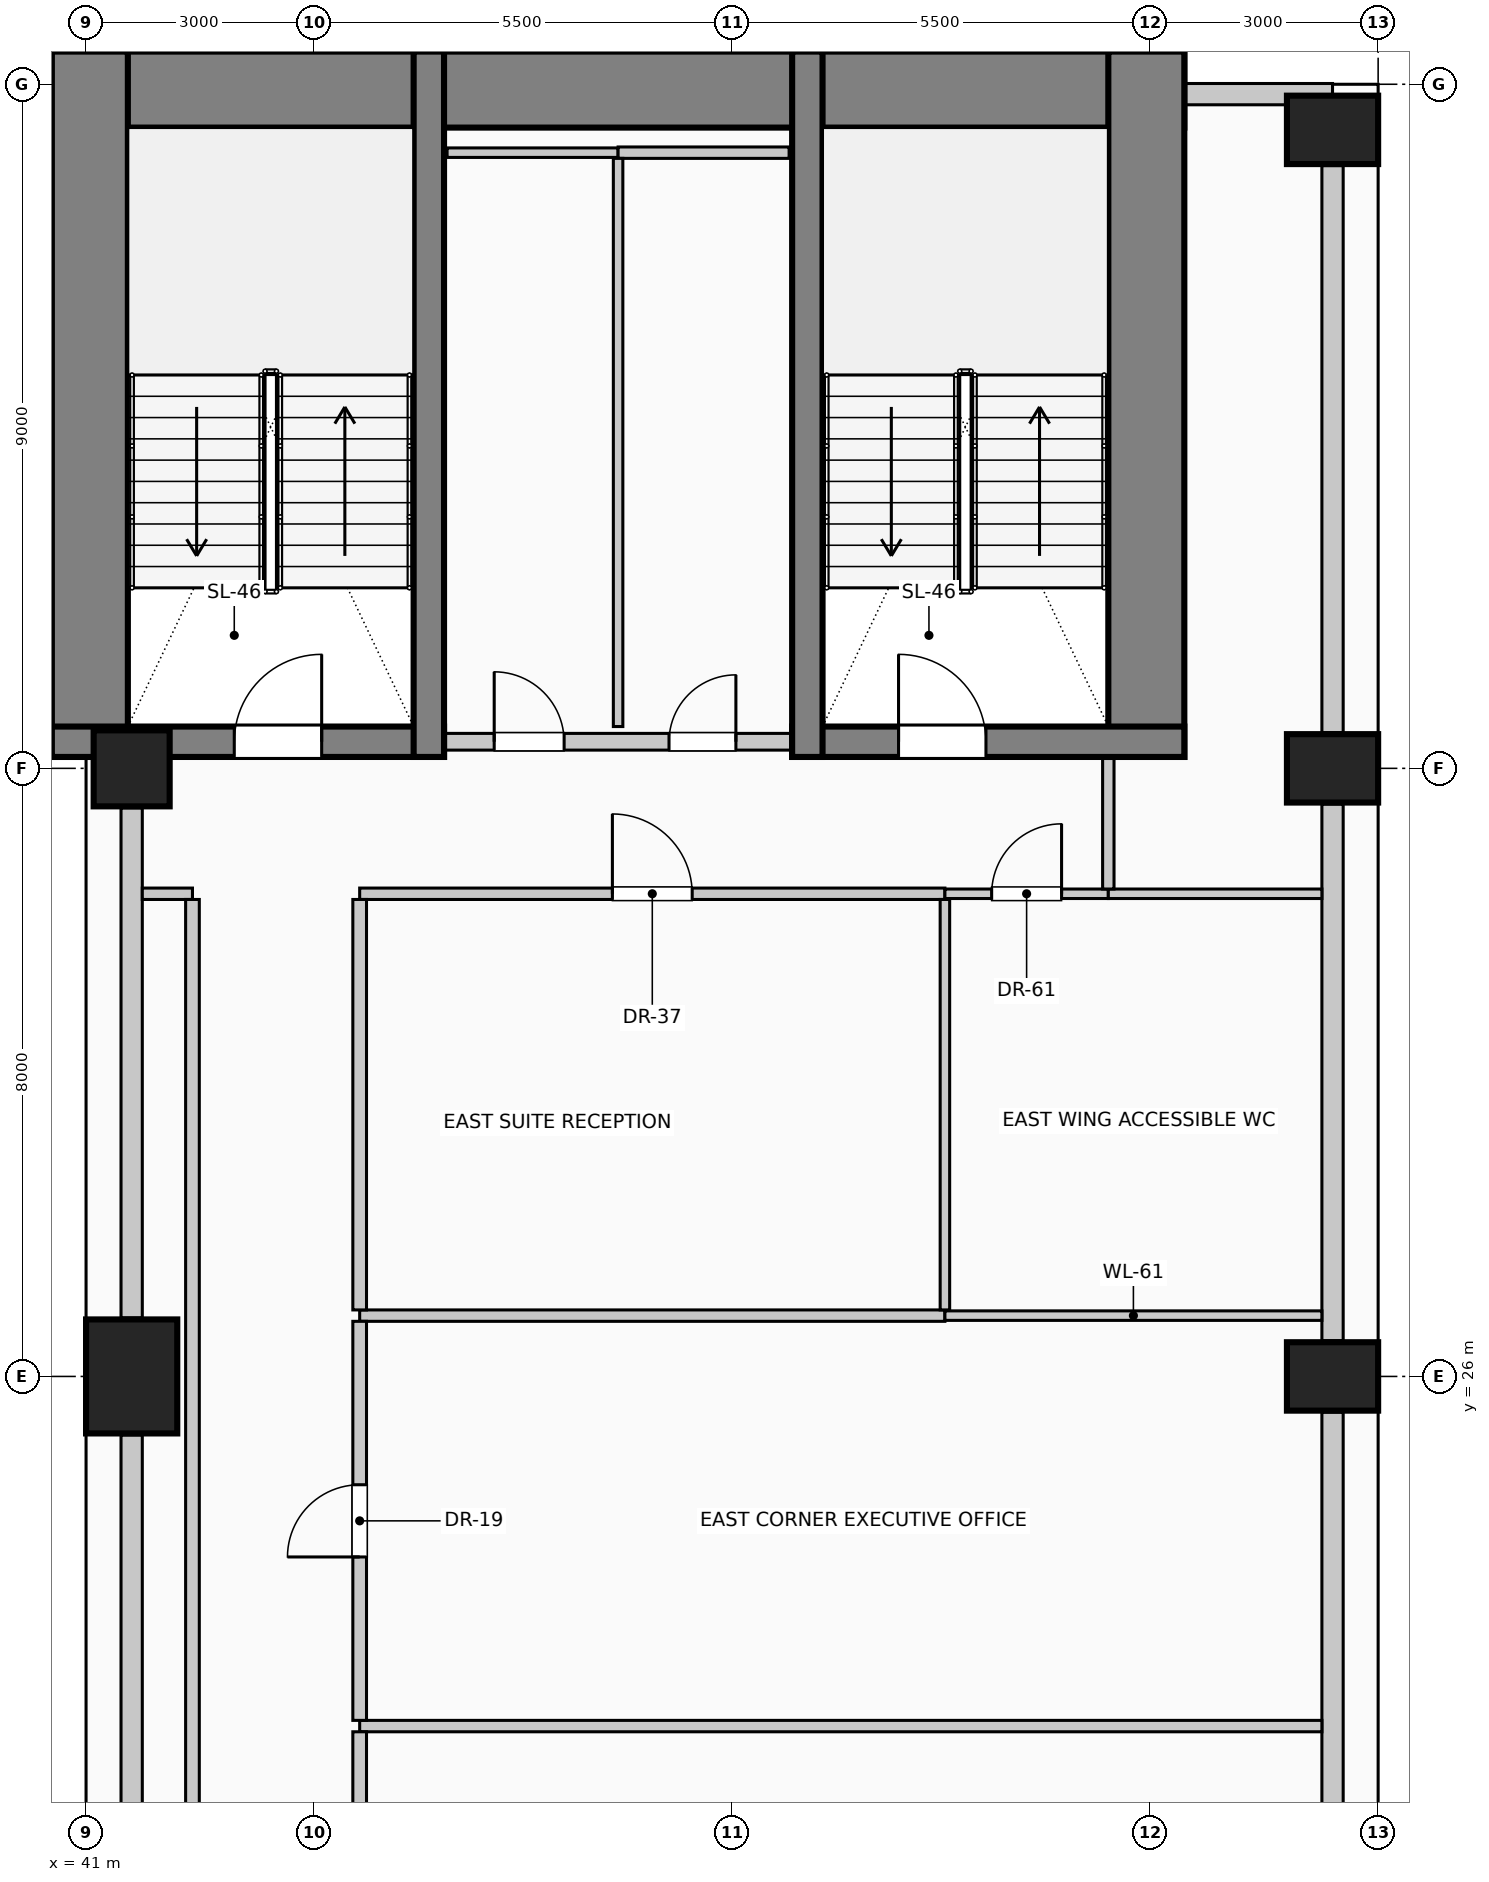
"""IFC4 building model, lengths in metres.
Left out: names, types, materials, properties, quantities, classifications, styles, units other than length and angle.
Written with IfcOpenShell. Run it as: python <this file> out.ifc"""

import sys

from ifc_helpers import new_model, si_unit, direction, frame, frame_2d, origin, origin_2d, place, context, subcontext, project, spatial, rectangle, circle, extrude, element, fill, save


model = new_model("IFC4")
c1 = context("Model", 3, precision=1e-05, world=origin(), true_north=direction((0.0, 1.0)))
c2 = subcontext(c1, "Body", "Model", "MODEL_VIEW")
j1 = project(units=[si_unit("LENGTHUNIT", "METRE"), si_unit("PLANEANGLEUNIT", "RADIAN")], contexts=[c1])
p1 = place(None, origin())
s1 = spatial("IfcSite", under=j1, at=p1, CompositionType="ELEMENT")
p2 = place(p1, origin())
s2 = spatial("IfcBuilding", under=s1, at=p2, CompositionType="ELEMENT")
p3 = place(p2, frame((0.0, 0.0, 26.6)))
s3 = spatial("IfcBuildingStorey", under=s2, at=p3, CompositionType="ELEMENT", Elevation=26.6)
p4 = place(p3, frame((40.55, 42.93, 0.0), z_axis=(0.0, 0.0, 1.0), x_axis=(1.0, 0.0, 0.0)))
e1 = element("IfcWall", 1, at=p4, inside=s3, PredefinedType="SHEAR", context=c2, shape_type="SweptSolid", body=[
    extrude(rectangle(XDim=14.9, YDim=1.0, at=frame_2d((7.45, 0.0))), origin(), (0.0, 0.0, 1.0), 4.0),
])
for number, where, z_axis, x_axis in (
    (2, (41.05, 34.15, 0.0), (0.0, 0.0, 1.0), (0.0, 1.0, 0.0)),
    (3, (54.95, 34.15, 0.0), (0.0, 0.0, 1.0), (0.0, 1.0, 0.0)),
):
    element("IfcWall", number, at=place(p3, frame(where, z_axis=z_axis, x_axis=x_axis)), inside=s3, PredefinedType="SHEAR", context=c2, shape_type="SweptSolid", body=[
        extrude(rectangle(XDim=9.28, YDim=1.0, at=frame_2d((4.64, 0.0))), origin(), (0.0, 0.0, 1.0), 4.0),
    ])
p5 = place(p3, frame((40.55, 34.35, 0.0), z_axis=(0.0, 0.0, 1.0), x_axis=(1.0, 0.0, 0.0)))
e4 = element("IfcWall", 4, at=p5, inside=s3, PredefinedType="SHEAR", context=c2, shape_type="SweptSolid", body=[
    extrude(rectangle(XDim=5.16, YDim=0.4, at=frame_2d((2.58, 0.0))), origin(), (0.0, 0.0, 1.0), 4.0),
])
p6 = place(p5, frame((2.4, 0.0, 0.0)))
e5 = element("IfcOpeningElement", 5, at=p6, cuts=e4, PredefinedType="OPENING", context=c2, shape_type="SweptSolid", body=[
    extrude(rectangle(XDim=1.15, YDim=2.2, at=frame_2d((0.575, 1.1))), frame((0.0, 0.21, 0.0), z_axis=(0.0, -1.0, 0.0), x_axis=(1.0, 0.0, 0.0)), (0.0, 0.0, 1.0), 0.42),
])
p7 = place(p3, frame((45.51, 34.15, 0.0), z_axis=(0.0, 0.0, 1.0), x_axis=(0.0, 1.0, 0.0)))
e6 = element("IfcWall", 6, at=p7, inside=s3, PredefinedType="SHEAR", context=c2, shape_type="SweptSolid", body=[
    extrude(rectangle(XDim=9.28, YDim=0.4, at=frame_2d((4.64, 0.0))), origin(), (0.0, 0.0, 1.0), 4.0),
])
p8 = place(p3, frame((50.29, 34.35, 0.0), z_axis=(0.0, 0.0, 1.0), x_axis=(1.0, 0.0, 0.0)))
e7 = element("IfcWall", 7, at=p8, inside=s3, PredefinedType="SHEAR", context=c2, shape_type="SweptSolid", body=[
    extrude(rectangle(XDim=5.16, YDim=0.4, at=frame_2d((2.58, 0.0))), origin(), (0.0, 0.0, 1.0), 4.0),
])
p9 = place(p8, frame((1.4, 0.0, 0.0)))
e8 = element("IfcOpeningElement", 8, at=p9, cuts=e7, PredefinedType="OPENING", context=c2, shape_type="SweptSolid", body=[
    extrude(rectangle(XDim=1.15, YDim=2.2, at=frame_2d((0.575, 1.1))), frame((0.0, 0.21, 0.0), z_axis=(0.0, -1.0, 0.0), x_axis=(1.0, 0.0, 0.0)), (0.0, 0.0, 1.0), 0.42),
])
p10 = place(p3, frame((50.49, 34.15, 0.0), z_axis=(0.0, 0.0, 1.0), x_axis=(0.0, 1.0, 0.0)))
e9 = element("IfcWall", 9, at=p10, inside=s3, PredefinedType="SHEAR", context=c2, shape_type="SweptSolid", body=[
    extrude(rectangle(XDim=9.28, YDim=0.4, at=frame_2d((4.64, 0.0))), origin(), (0.0, 0.0, 1.0), 4.0),
])
for number, where, z_axis, x_axis in (
    (10, (57.4, 26.0, 0.0), (0.0, 0.0, 1.0), (0.0, 1.0, 0.0)),
    (11, (57.4, 34.0, 0.0), (0.0, 0.0, 1.0), (0.0, 1.0, 0.0)),
    (12, (57.4, 42.4, 0.0), (0.0, 0.0, 1.0), (0.0, 1.0, 0.0)),
):
    element("IfcColumn", number, at=place(p3, frame(where, z_axis=z_axis, x_axis=x_axis)), inside=s3, PredefinedType="COLUMN", context=c2, shape_type="SweptSolid", body=[
        extrude(rectangle(XDim=0.9, YDim=1.2, at=origin_2d()), origin(), (0.0, 0.0, 1.0), 4.0),
    ])
p11 = place(p3, frame((41.6, 26.0, 0.0), z_axis=(0.0, 0.0, 1.0), x_axis=(1.0, 0.0, 0.0)))
e13 = element("IfcColumn", 13, at=p11, inside=s3, PredefinedType="COLUMN", context=c2, shape_type="SweptSolid", body=[
    extrude(rectangle(XDim=1.2, YDim=1.5, at=origin_2d()), origin(), (0.0, 0.0, 1.0), 4.0),
])
p12 = place(p3, frame((41.6, 34.0, 0.0), z_axis=(0.0, 0.0, 1.0), x_axis=(1.0, 0.0, 0.0)))
e14 = element("IfcColumn", 14, at=p12, inside=s3, PredefinedType="COLUMN", context=c2, shape_type="SweptSolid", body=[
    extrude(circle(Radius=0.5, at=origin_2d()), origin(), (0.0, 0.0, 1.0), 4.0),
])
for number, where, z_axis, x_axis in (
    (15, (57.4, 25.53, 0.0), (0.0, 0.0, 1.0), (0.0, -1.0, 0.0)),
    (16, (57.4, 33.53, 0.0), (0.0, 0.0, 1.0), (0.0, -1.0, 0.0)),
):
    element("IfcWall", number, at=place(p3, frame(where, z_axis=z_axis, x_axis=x_axis)), inside=s3, PredefinedType="SOLIDWALL", context=c2, shape_type="SweptSolid", body=[
        extrude(rectangle(XDim=7.06, YDim=0.28, at=frame_2d((3.53, 0.0))), origin(), (0.0, 0.0, 1.0), 2.85),
    ])
p13 = place(p3, frame((57.4, 41.93, 0.0), z_axis=(0.0, 0.0, 1.0), x_axis=(0.0, -1.0, 0.0)))
e17 = element("IfcWall", 17, at=p13, inside=s3, PredefinedType="SOLIDWALL", context=c2, shape_type="SweptSolid", body=[
    extrude(rectangle(XDim=7.46, YDim=0.28, at=frame_2d((3.73, 0.0))), origin(), (0.0, 0.0, 1.0), 2.85),
])
p14 = place(p3, frame((55.455, 42.87, 0.0), z_axis=(0.0, 0.0, 1.0), x_axis=(1.0, 0.0, 0.0)))
e18 = element("IfcWall", 18, at=p14, inside=s3, PredefinedType="SOLIDWALL", context=c2, shape_type="SweptSolid", body=[
    extrude(rectangle(XDim=1.945, YDim=0.28, at=frame_2d((0.972, 0.0))), origin(), (0.0, 0.0, 1.0), 3.7),
])
p15 = place(p3, frame((41.6, 18.77, 0.0), z_axis=(0.0, 0.0, 1.0), x_axis=(0.0, 1.0, 0.0)))
e19 = element("IfcWall", 19, at=p15, inside=s3, PredefinedType="SOLIDWALL", context=c2, shape_type="SweptSolid", body=[
    extrude(rectangle(XDim=6.46, YDim=0.28, at=frame_2d((3.23, 0.0))), origin(), (0.0, 0.0, 1.0), 3.0),
])
p16 = place(p3, frame((41.6, 26.77, 0.0), z_axis=(0.0, 0.0, 1.0), x_axis=(0.0, 1.0, 0.0)))
e20 = element("IfcWall", 20, at=p16, inside=s3, PredefinedType="SOLIDWALL", context=c2, shape_type="SweptSolid", body=[
    extrude(rectangle(XDim=6.71, YDim=0.28, at=frame_2d((3.355, 0.0))), origin(), (0.0, 0.0, 1.0), 3.0),
])
p17 = place(p3, frame((45.72, 34.35, 0.0), z_axis=(0.0, 0.0, 1.0), x_axis=(1.0, 0.0, 0.0)))
e21 = element("IfcWall", 21, at=p17, inside=s3, PredefinedType="PARTITIONING", context=c2, shape_type="SweptSolid", body=[
    extrude(rectangle(XDim=4.56, YDim=0.22, at=frame_2d((2.28, 0.0))), origin(), (0.0, 0.0, 1.0), 3.7),
])
p18 = place(p17, frame((0.65, 0.0, 0.0)))
e22 = element("IfcOpeningElement", 22, at=p18, cuts=e21, PredefinedType="OPENING", context=c2, shape_type="SweptSolid", body=[
    extrude(rectangle(XDim=0.92, YDim=2.1, at=frame_2d((0.46, 1.05))), frame((0.0, 0.12, 0.0), z_axis=(0.0, -1.0, 0.0), x_axis=(1.0, 0.0, 0.0)), (0.0, 0.0, 1.0), 0.24),
])
p19 = place(p17, frame((2.95, 0.0, 0.0)))
e23 = element("IfcOpeningElement", 23, at=p19, cuts=e21, PredefinedType="OPENING", context=c2, shape_type="SweptSolid", body=[
    extrude(rectangle(XDim=0.88, YDim=2.1, at=frame_2d((0.44, 1.05))), frame((0.0, 0.12, 0.0), z_axis=(0.0, -1.0, 0.0), x_axis=(1.0, 0.0, 0.0)), (0.0, 0.0, 1.0), 0.24),
])
p20 = place(p3, frame((44.6, 21.4, 0.0), z_axis=(0.0, 0.0, 1.0), x_axis=(1.0, 0.0, 0.0)))
e24 = element("IfcWall", 24, at=p20, inside=s3, PredefinedType="PARTITIONING", context=c2, shape_type="SweptSolid", body=[
    extrude(rectangle(XDim=12.66, YDim=0.15, at=frame_2d((6.33, 0.0))), origin(), (0.0, 0.0, 1.0), 3.7),
])
p21 = place(p3, frame((44.6, 26.8, 0.0), z_axis=(0.0, 0.0, 1.0), x_axis=(1.0, 0.0, 0.0)))
e25 = element("IfcWall", 25, at=p21, inside=s3, PredefinedType="PARTITIONING", context=c2, shape_type="SweptSolid", body=[
    extrude(rectangle(XDim=7.7, YDim=0.15, at=frame_2d((3.85, 0.0))), origin(), (0.0, 0.0, 1.0), 3.7),
])
p22 = place(p3, frame((52.3, 26.8, 0.0), z_axis=(0.0, 0.0, 1.0), x_axis=(1.0, 0.0, 0.0)))
e26 = element("IfcWall", 26, at=p22, inside=s3, PredefinedType="PARTITIONING", context=c2, shape_type="SweptSolid", body=[
    extrude(rectangle(XDim=4.96, YDim=0.125, at=frame_2d((2.48, 0.0))), origin(), (0.0, 0.0, 1.0), 3.7),
])
p23 = place(p3, frame((41.74, 32.35, 0.0), z_axis=(0.0, 0.0, 1.0), x_axis=(1.0, 0.0, 0.0)))
e27 = element("IfcWall", 27, at=p23, inside=s3, PredefinedType="PARTITIONING", context=c2, shape_type="SweptSolid", body=[
    extrude(rectangle(XDim=0.66, YDim=0.15, at=frame_2d((0.33, 0.0))), origin(), (0.0, 0.0, 1.0), 3.7),
])
p24 = place(p3, frame((44.6, 32.35, 0.0), z_axis=(0.0, 0.0, 1.0), x_axis=(1.0, 0.0, 0.0)))
e28 = element("IfcWall", 28, at=p24, inside=s3, PredefinedType="PARTITIONING", context=c2, shape_type="SweptSolid", body=[
    extrude(rectangle(XDim=7.7, YDim=0.15, at=frame_2d((3.85, 0.0))), origin(), (0.0, 0.0, 1.0), 3.7),
])
p25 = place(p24, frame((3.325, 0.0, 0.0)))
e29 = element("IfcOpeningElement", 29, at=p25, cuts=e28, PredefinedType="OPENING", context=c2, shape_type="SweptSolid", body=[
    extrude(rectangle(XDim=1.05, YDim=2.15, at=frame_2d((0.525, 1.075))), frame((0.0, 0.085, 0.0), z_axis=(0.0, -1.0, 0.0), x_axis=(1.0, 0.0, 0.0)), (0.0, 0.0, 1.0), 0.17),
])
p26 = place(p3, frame((52.3, 32.35, 0.0), z_axis=(0.0, 0.0, 1.0), x_axis=(1.0, 0.0, 0.0)))
e30 = element("IfcWall", 30, at=p26, inside=s3, PredefinedType="PARTITIONING", context=c2, shape_type="SweptSolid", body=[
    extrude(rectangle(XDim=2.15, YDim=0.125, at=frame_2d((1.075, 0.0))), origin(), (0.0, 0.0, 1.0), 3.7),
])
p27 = place(p26, frame((0.615, 0.0, 0.0)))
e31 = element("IfcOpeningElement", 31, at=p27, cuts=e30, PredefinedType="OPENING", context=c2, shape_type="SweptSolid", body=[
    extrude(rectangle(XDim=0.92, YDim=2.1, at=frame_2d((0.46, 1.05))), frame((0.0, 0.073, 0.0), z_axis=(0.0, -1.0, 0.0), x_axis=(1.0, 0.0, 0.0)), (0.0, 0.0, 1.0), 0.145),
])
p28 = place(p3, frame((54.45, 32.35, 0.0), z_axis=(0.0, 0.0, 1.0), x_axis=(1.0, 0.0, 0.0)))
e32 = element("IfcWall", 32, at=p28, inside=s3, PredefinedType="PARTITIONING", context=c2, shape_type="SweptSolid", body=[
    extrude(rectangle(XDim=2.81, YDim=0.125, at=frame_2d((1.405, 0.0))), origin(), (0.0, 0.0, 1.0), 3.7),
])
p29 = place(p3, frame((45.75, 42.1, 0.0), z_axis=(0.0, 0.0, 1.0), x_axis=(1.0, 0.0, 0.0)))
e33 = element("IfcWall", 33, at=p29, inside=s3, PredefinedType="PARTITIONING", context=c2, shape_type="SweptSolid", body=[
    extrude(rectangle(XDim=2.25, YDim=0.125, at=frame_2d((1.125, 0.0))), origin(), (0.0, 0.0, 1.0), 3.7),
])
p30 = place(p3, frame((48.0, 42.1, 0.0), z_axis=(0.0, 0.0, 1.0), x_axis=(1.0, 0.0, 0.0)))
e34 = element("IfcWall", 34, at=p30, inside=s3, PredefinedType="PARTITIONING", context=c2, shape_type="SweptSolid", body=[
    extrude(rectangle(XDim=2.25, YDim=0.15, at=frame_2d((1.125, 0.0))), origin(), (0.0, 0.0, 1.0), 3.7),
])
p31 = place(p3, frame((42.4, 6.89, 0.0), z_axis=(0.0, 0.0, 1.0), x_axis=(0.0, 1.0, 0.0)))
e35 = element("IfcWall", 35, at=p31, inside=s3, PredefinedType="PARTITIONING", context=c2, shape_type="SweptSolid", body=[
    extrude(rectangle(XDim=25.385, YDim=0.18, at=frame_2d((12.692, 0.0))), origin(), (0.0, 0.0, 1.0), 3.7),
])
p32 = place(p3, frame((44.6, 16.075, 0.0), z_axis=(0.0, 0.0, 1.0), x_axis=(0.0, 1.0, 0.0)))
e36 = element("IfcWall", 36, at=p32, inside=s3, PredefinedType="PARTITIONING", context=c2, shape_type="SweptSolid", body=[
    extrude(rectangle(XDim=5.25, YDim=0.18, at=frame_2d((2.625, 0.0))), origin(), (0.0, 0.0, 1.0), 3.7),
])
p33 = place(p32, frame((2.1, 0.0, 0.0)))
e37 = element("IfcOpeningElement", 37, at=p33, cuts=e36, PredefinedType="OPENING", context=c2, shape_type="SweptSolid", body=[
    extrude(rectangle(XDim=1.05, YDim=2.15, at=frame_2d((0.525, 1.075))), frame((0.0, 0.1, 0.0), z_axis=(0.0, -1.0, 0.0), x_axis=(1.0, 0.0, 0.0)), (0.0, 0.0, 1.0), 0.2),
])
p34 = place(p3, frame((44.6, 21.475, 0.0), z_axis=(0.0, 0.0, 1.0), x_axis=(0.0, 1.0, 0.0)))
e38 = element("IfcWall", 38, at=p34, inside=s3, PredefinedType="PARTITIONING", context=c2, shape_type="SweptSolid", body=[
    extrude(rectangle(XDim=5.25, YDim=0.18, at=frame_2d((2.625, 0.0))), origin(), (0.0, 0.0, 1.0), 3.7),
])
p35 = place(p34, frame((2.15, 0.0, 0.0)))
e39 = element("IfcOpeningElement", 39, at=p35, cuts=e38, PredefinedType="OPENING", context=c2, shape_type="SweptSolid", body=[
    extrude(rectangle(XDim=0.95, YDim=2.15, at=frame_2d((0.475, 1.075))), frame((0.0, 0.1, 0.0), z_axis=(0.0, -1.0, 0.0), x_axis=(1.0, 0.0, 0.0)), (0.0, 0.0, 1.0), 0.2),
])
p36 = place(p3, frame((44.6, 26.875, 0.0), z_axis=(0.0, 0.0, 1.0), x_axis=(0.0, 1.0, 0.0)))
e40 = element("IfcWall", 40, at=p36, inside=s3, PredefinedType="PARTITIONING", context=c2, shape_type="SweptSolid", body=[
    extrude(rectangle(XDim=5.4, YDim=0.18, at=frame_2d((2.7, 0.0))), origin(), (0.0, 0.0, 1.0), 3.7),
])
p37 = place(p3, frame((48.0, 34.55, 0.0), z_axis=(0.0, 0.0, 1.0), x_axis=(0.0, 1.0, 0.0)))
e41 = element("IfcWall", 41, at=p37, inside=s3, PredefinedType="PARTITIONING", context=c2, shape_type="SweptSolid", body=[
    extrude(rectangle(XDim=7.475, YDim=0.125, at=frame_2d((3.737, 0.0))), origin(), (0.0, 0.0, 1.0), 3.7),
])
p38 = place(p3, frame((52.3, 26.875, 0.0), z_axis=(0.0, 0.0, 1.0), x_axis=(0.0, 1.0, 0.0)))
e42 = element("IfcWall", 42, at=p38, inside=s3, PredefinedType="PARTITIONING", context=c2, shape_type="SweptSolid", body=[
    extrude(rectangle(XDim=5.4, YDim=0.125, at=frame_2d((2.7, 0.0))), origin(), (0.0, 0.0, 1.0), 3.7),
])
p39 = place(p3, frame((54.45, 32.413, 0.0), z_axis=(0.0, 0.0, 1.0), x_axis=(0.0, 1.0, 0.0)))
e43 = element("IfcWall", 43, at=p39, inside=s3, PredefinedType="PARTITIONING", context=c2, shape_type="SweptSolid", body=[
    extrude(rectangle(XDim=1.737, YDim=0.15, at=frame_2d((0.869, 0.0))), origin(), (0.0, 0.0, 1.0), 3.7),
])
p40 = place(p6, origin())
e44 = element("IfcDoor", 44, at=p40, inside=s3, OperationType="SINGLE_SWING_RIGHT", PredefinedType="DOOR", context=c2, shape_type="SweptSolid", body=[
    extrude(rectangle(XDim=1.15, YDim=2.2, at=frame_2d((0.575, 1.1))), frame((0.0, 0.025, 0.0), z_axis=(0.0, -1.0, 0.0), x_axis=(1.0, 0.0, 0.0)), (0.0, 0.0, 1.0), 0.05),
])
fill(e5, e44)
p41 = place(p18, origin())
e45 = element("IfcDoor", 45, at=p41, inside=s3, OperationType="SINGLE_SWING_LEFT", PredefinedType="DOOR", context=c2, shape_type="SweptSolid", body=[
    extrude(rectangle(XDim=0.92, YDim=2.1, at=frame_2d((0.46, 1.05))), frame((0.0, 0.025, 0.0), z_axis=(0.0, -1.0, 0.0), x_axis=(1.0, 0.0, 0.0)), (0.0, 0.0, 1.0), 0.05),
])
fill(e22, e45)
p42 = place(p19, origin())
e46 = element("IfcDoor", 46, at=p42, inside=s3, OperationType="SINGLE_SWING_RIGHT", PredefinedType="DOOR", context=c2, shape_type="SweptSolid", body=[
    extrude(rectangle(XDim=0.88, YDim=2.1, at=frame_2d((0.44, 1.05))), frame((0.0, 0.025, 0.0), z_axis=(0.0, -1.0, 0.0), x_axis=(1.0, 0.0, 0.0)), (0.0, 0.0, 1.0), 0.05),
])
fill(e23, e46)
p43 = place(p9, origin())
e47 = element("IfcDoor", 47, at=p43, inside=s3, OperationType="SINGLE_SWING_LEFT", PredefinedType="DOOR", context=c2, shape_type="SweptSolid", body=[
    extrude(rectangle(XDim=1.15, YDim=2.2, at=frame_2d((0.575, 1.1))), frame((0.0, 0.025, 0.0), z_axis=(0.0, -1.0, 0.0), x_axis=(1.0, 0.0, 0.0)), (0.0, 0.0, 1.0), 0.05),
])
fill(e8, e47)
p44 = place(p25, origin())
e48 = element("IfcDoor", 48, at=p44, inside=s3, OperationType="SINGLE_SWING_LEFT", PredefinedType="DOOR", context=c2, shape_type="SweptSolid", body=[
    extrude(rectangle(XDim=1.05, YDim=2.15, at=frame_2d((0.525, 1.075))), frame((0.0, 0.025, 0.0), z_axis=(0.0, -1.0, 0.0), x_axis=(1.0, 0.0, 0.0)), (0.0, 0.0, 1.0), 0.05),
])
fill(e29, e48)
p45 = place(p27, origin())
e49 = element("IfcDoor", 49, at=p45, inside=s3, OperationType="SINGLE_SWING_RIGHT", PredefinedType="DOOR", context=c2, shape_type="SweptSolid", body=[
    extrude(rectangle(XDim=0.92, YDim=2.1, at=frame_2d((0.46, 1.05))), frame((0.0, 0.025, 0.0), z_axis=(0.0, -1.0, 0.0), x_axis=(1.0, 0.0, 0.0)), (0.0, 0.0, 1.0), 0.05),
])
fill(e31, e49)
p46 = place(p35, origin())
e50 = element("IfcDoor", 50, at=p46, inside=s3, OperationType="SINGLE_SWING_LEFT", PredefinedType="DOOR", context=c2, shape_type="SweptSolid", body=[
    extrude(rectangle(XDim=0.95, YDim=2.15, at=frame_2d((0.475, 1.075))), frame((0.0, 0.025, 0.0), z_axis=(0.0, -1.0, 0.0), x_axis=(1.0, 0.0, 0.0)), (0.0, 0.0, 1.0), 0.05),
])
fill(e39, e50)
save(model, sys.argv[1])
